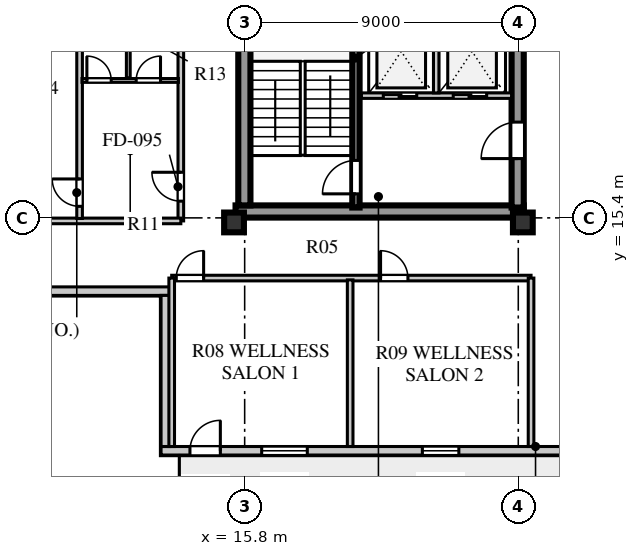
"""IFC4 building model, lengths in metres.
Left out: names, types, materials, properties, quantities, classifications, styles, units other than length and angle.
Written with IfcOpenShell. Run it as: python <this file> out.ifc"""

import sys

from ifc_helpers import new_model, si_unit, direction, frame, frame_2d, origin, origin_2d, place, context, subcontext, project, spatial, rectangle, extrude, element, fill, save


model = new_model("IFC4")
c1 = context("Model", 3, precision=1e-05, world=origin(), true_north=direction((0.0, 1.0)))
c2 = subcontext(c1, "Body", "Model", "MODEL_VIEW")
j1 = project(units=[si_unit("LENGTHUNIT", "METRE"), si_unit("PLANEANGLEUNIT", "RADIAN")], contexts=[c1])
p1 = place(None, origin())
s1 = spatial("IfcSite", under=j1, at=p1, CompositionType="ELEMENT")
p2 = place(p1, origin())
s2 = spatial("IfcBuilding", under=s1, at=p2, CompositionType="ELEMENT")
p3 = place(p2, frame((0.0, 0.0, 260.9)))
s3 = spatial("IfcBuildingStorey", under=s2, at=p3, CompositionType="ELEMENT", Elevation=260.9)
p4 = place(p3, frame((15.5, 15.61, 0.0), z_axis=(0.0, 0.0, 1.0), x_axis=(1.0, 0.0, 0.0)))
e1 = element("IfcWall", 1, at=p4, inside=s3, PredefinedType="SHEAR", context=c2, shape_type="SweptSolid", body=[
    extrude(rectangle(XDim=9.48, YDim=0.4, at=frame_2d((4.74, 0.0))), origin(), (0.0, 0.0, 1.0), 3.66),
])
p5 = place(p3, frame((15.79, 15.81, 0.0), z_axis=(0.0, 0.0, 1.0), x_axis=(0.0, 1.0, 0.0)))
e2 = element("IfcWall", 2, at=p5, inside=s3, PredefinedType="SHEAR", context=c2, shape_type="SweptSolid", body=[
    extrude(rectangle(XDim=25.63, YDim=0.4, at=frame_2d((12.815, 0.0))), origin(), (0.0, 0.0, 1.0), 3.66),
])
p6 = place(p3, frame((24.78, 15.74, 0.0), z_axis=(0.0, 0.0, 1.0), x_axis=(0.0, 1.0, 0.0)))
e3 = element("IfcWall", 3, at=p6, inside=s3, PredefinedType="SHEAR", context=c2, shape_type="SweptSolid", body=[
    extrude(rectangle(XDim=25.76, YDim=0.4, at=frame_2d((12.88, 0.0))), origin(), (0.0, 0.0, 1.0), 3.66),
])
p7 = place(p6, frame((1.61, 0.0, 0.0)))
e4 = element("IfcOpeningElement", 4, at=p7, cuts=e3, PredefinedType="OPENING", context=c2, shape_type="SweptSolid", body=[
    extrude(rectangle(XDim=1.2, YDim=2.1, at=frame_2d((0.6, 1.05))), frame((0.0, 0.21, 0.0), z_axis=(0.0, -1.0, 0.0), x_axis=(1.0, 0.0, 0.0)), (0.0, 0.0, 1.0), 0.42),
])
p8 = place(p6, frame((6.78, 0.0, 0.0)))
e5 = element("IfcOpeningElement", 5, at=p8, cuts=e3, PredefinedType="OPENING", context=c2, shape_type="SweptSolid", body=[
    extrude(rectangle(XDim=0.85, YDim=2.06, at=frame_2d((0.425, 1.03))), frame((0.0, 0.21, 0.0), z_axis=(0.0, -1.0, 0.0), x_axis=(1.0, 0.0, 0.0)), (0.0, 0.0, 1.0), 0.42),
])
p9 = place(p6, frame((12.11, 0.0, 0.0)))
e6 = element("IfcOpeningElement", 6, at=p9, cuts=e3, PredefinedType="OPENING", context=c2, shape_type="SweptSolid", body=[
    extrude(rectangle(XDim=1.5, YDim=2.12, at=frame_2d((0.75, 1.06))), frame((0.0, 0.21, 0.0), z_axis=(0.0, -1.0, 0.0), x_axis=(1.0, 0.0, 0.0)), (0.0, 0.0, 1.0), 0.42),
])
p10 = place(p6, frame((20.11, 0.0, 0.0)))
e7 = element("IfcOpeningElement", 7, at=p10, cuts=e3, PredefinedType="OPENING", context=c2, shape_type="SweptSolid", body=[
    extrude(rectangle(XDim=1.2, YDim=2.12, at=frame_2d((0.6, 1.06))), frame((0.0, 0.21, 0.0), z_axis=(0.0, -1.0, 0.0), x_axis=(1.0, 0.0, 0.0)), (0.0, 0.0, 1.0), 0.42),
])
p11 = place(p6, frame((24.01, 0.0, 0.0)))
e8 = element("IfcOpeningElement", 8, at=p11, cuts=e3, PredefinedType="OPENING", context=c2, shape_type="SweptSolid", body=[
    extrude(rectangle(XDim=0.95, YDim=2.1, at=frame_2d((0.475, 1.05))), frame((0.0, 0.21, 0.0), z_axis=(0.0, -1.0, 0.0), x_axis=(1.0, 0.0, 0.0)), (0.0, 0.0, 1.0), 0.42),
])
for number, where, z_axis, x_axis in (
    (9, (15.45, 15.25, 0.0), (0.0, 0.0, 1.0), (1.0, 0.0, 0.0)),
    (10, (24.95, 15.25, 0.0), (0.0, 0.0, 1.0), (1.0, 0.0, 0.0)),
):
    element("IfcColumn", number, at=place(p3, frame(where, z_axis=z_axis, x_axis=x_axis)), inside=s3, PredefinedType="COLUMN", context=c2, shape_type="SweptSolid", body=[
        extrude(rectangle(XDim=0.65, YDim=0.65, at=origin_2d()), origin(), (0.0, 0.0, 1.0), 3.66),
    ])
p12 = place(p3, frame((13.05, 7.74, 0.0), z_axis=(0.0, 0.0, 1.0), x_axis=(1.0, 0.0, 0.0)))
e11 = element("IfcWall", 11, at=p12, inside=s3, PredefinedType="STANDARD", context=c2, shape_type="SweptSolid", body=[
    extrude(rectangle(XDim=32.5, YDim=0.28, at=frame_2d((16.25, 0.0))), origin(), (0.0, 0.0, 1.0), 3.66),
])
p13 = place(p12, frame((0.95, 0.0, 0.0)))
e12 = element("IfcOpeningElement", 12, at=p13, cuts=e11, PredefinedType="OPENING", context=c2, shape_type="SweptSolid", body=[
    extrude(rectangle(XDim=1.0, YDim=2.05, at=frame_2d((0.5, 1.025))), frame((0.0, 0.15, 0.0), z_axis=(0.0, -1.0, 0.0), x_axis=(1.0, 0.0, 0.0)), (0.0, 0.0, 1.0), 0.3),
])
p14 = place(p12, frame((3.31, 0.0, 0.8)))
e13 = element("IfcOpeningElement", 13, at=p14, cuts=e11, PredefinedType="OPENING", context=c2, shape_type="SweptSolid", body=[
    extrude(rectangle(XDim=1.5, YDim=2.0, at=frame_2d((0.75, 1.0))), frame((0.0, 0.15, 0.0), z_axis=(0.0, -1.0, 0.0), x_axis=(1.0, 0.0, 0.0)), (0.0, 0.0, 1.0), 0.3),
])
p15 = place(p12, frame((8.595, 0.0, 0.8)))
e14 = element("IfcOpeningElement", 14, at=p15, cuts=e11, PredefinedType="OPENING", context=c2, shape_type="SweptSolid", body=[
    extrude(rectangle(XDim=1.2, YDim=1.75, at=frame_2d((0.6, 0.875))), frame((0.0, 0.15, 0.0), z_axis=(0.0, -1.0, 0.0), x_axis=(1.0, 0.0, 0.0)), (0.0, 0.0, 1.0), 0.3),
])
p16 = place(p12, frame((14.84, 0.0, 0.8)))
e15 = element("IfcOpeningElement", 15, at=p16, cuts=e11, PredefinedType="OPENING", context=c2, shape_type="SweptSolid", body=[
    extrude(rectangle(XDim=2.4, YDim=2.05, at=frame_2d((1.2, 1.025))), frame((0.0, 0.15, 0.0), z_axis=(0.0, -1.0, 0.0), x_axis=(1.0, 0.0, 0.0)), (0.0, 0.0, 1.0), 0.3),
])
p17 = place(p12, frame((19.0, 0.0, 0.8)))
e16 = element("IfcOpeningElement", 16, at=p17, cuts=e11, PredefinedType="OPENING", context=c2, shape_type="SweptSolid", body=[
    extrude(rectangle(XDim=2.1, YDim=1.95, at=frame_2d((1.05, 0.975))), frame((0.0, 0.15, 0.0), z_axis=(0.0, -1.0, 0.0), x_axis=(1.0, 0.0, 0.0)), (0.0, 0.0, 1.0), 0.3),
])
p18 = place(p12, frame((23.4, 0.0, 0.8)))
e17 = element("IfcOpeningElement", 17, at=p18, cuts=e11, PredefinedType="OPENING", context=c2, shape_type="SweptSolid", body=[
    extrude(rectangle(XDim=1.35, YDim=1.9, at=frame_2d((0.675, 0.95))), frame((0.0, 0.15, 0.0), z_axis=(0.0, -1.0, 0.0), x_axis=(1.0, 0.0, 0.0)), (0.0, 0.0, 1.0), 0.3),
])
p19 = place(p12, frame((28.42, 0.0, 0.8)))
e18 = element("IfcOpeningElement", 18, at=p19, cuts=e11, PredefinedType="OPENING", context=c2, shape_type="SweptSolid", body=[
    extrude(rectangle(XDim=1.65, YDim=1.95, at=frame_2d((0.825, 0.975))), frame((0.0, 0.15, 0.0), z_axis=(0.0, -1.0, 0.0), x_axis=(1.0, 0.0, 0.0)), (0.0, 0.0, 1.0), 0.3),
])
p20 = place(p3, frame((7.8, 12.99, 0.0), z_axis=(0.0, 0.0, 1.0), x_axis=(1.0, 0.0, 0.0)))
e19 = element("IfcWall", 19, at=p20, inside=s3, PredefinedType="STANDARD", context=c2, shape_type="SweptSolid", body=[
    extrude(rectangle(XDim=5.53, YDim=0.28, at=frame_2d((2.765, 0.0))), origin(), (0.0, 0.0, 1.0), 3.66),
])
p21 = place(p3, frame((13.19, 12.85, 0.0), z_axis=(0.0, 0.0, 1.0), x_axis=(0.0, -1.0, 0.0)))
e20 = element("IfcWall", 20, at=p21, inside=s3, PredefinedType="STANDARD", context=c2, shape_type="SweptSolid", body=[
    extrude(rectangle(XDim=4.97, YDim=0.28, at=frame_2d((2.485, 0.0))), origin(), (0.0, 0.0, 1.0), 3.66),
])
p22 = place(p3, frame((19.46, 15.74, 0.0), z_axis=(0.0, 0.0, 1.0), x_axis=(0.0, 1.0, 0.0)))
e21 = element("IfcWall", 21, at=p22, inside=s3, PredefinedType="SHEAR", context=c2, shape_type="SweptSolid", body=[
    extrude(rectangle(XDim=8.2, YDim=0.24, at=frame_2d((4.1, 0.0))), origin(), (0.0, 0.0, 1.0), 3.9),
])
p23 = place(p22, frame((0.45, 0.0, 0.0)))
e22 = element("IfcOpeningElement", 22, at=p23, cuts=e21, PredefinedType="OPENING", context=c2, shape_type="SweptSolid", body=[
    extrude(rectangle(XDim=1.1, YDim=2.1, at=frame_2d((0.55, 1.05))), frame((0.0, 0.13, 0.0), z_axis=(0.0, -1.0, 0.0), x_axis=(1.0, 0.0, 0.0)), (0.0, 0.0, 1.0), 0.26),
])
p24 = place(p3, frame((19.64, 19.42, 0.0), z_axis=(0.0, 0.0, 1.0), x_axis=(1.0, 0.0, 0.0)))
e23 = element("IfcWall", 23, at=p24, inside=s3, PredefinedType="SOLIDWALL", context=c2, shape_type="SweptSolid", body=[
    extrude(rectangle(XDim=4.94, YDim=0.18, at=frame_2d((2.47, 0.0))), origin(), (0.0, 0.0, 1.0), 3.66),
])
p25 = place(p24, frame((0.72, 0.0, 0.0)))
e24 = element("IfcOpeningElement", 24, at=p25, cuts=e23, PredefinedType="OPENING", context=c2, shape_type="SweptSolid", body=[
    extrude(rectangle(XDim=1.1, YDim=2.1, at=frame_2d((0.55, 1.05))), frame((0.0, 0.1, 0.0), z_axis=(0.0, -1.0, 0.0), x_axis=(1.0, 0.0, 0.0)), (0.0, 0.0, 1.0), 0.2),
])
p26 = place(p24, frame((3.02, 0.0, 0.0)))
e25 = element("IfcOpeningElement", 25, at=p26, cuts=e23, PredefinedType="OPENING", context=c2, shape_type="SweptSolid", body=[
    extrude(rectangle(XDim=1.1, YDim=2.1, at=frame_2d((0.55, 1.05))), frame((0.0, 0.1, 0.0), z_axis=(0.0, -1.0, 0.0), x_axis=(1.0, 0.0, 0.0)), (0.0, 0.0, 1.0), 0.2),
])
p27 = place(p3, frame((22.1, 19.51, 0.0), z_axis=(0.0, 0.0, 1.0), x_axis=(0.0, 1.0, 0.0)))
e26 = element("IfcWall", 26, at=p27, inside=s3, PredefinedType="SOLIDWALL", context=c2, shape_type="SweptSolid", body=[
    extrude(rectangle(XDim=2.74, YDim=0.18, at=frame_2d((1.37, 0.0))), origin(), (0.0, 0.0, 1.0), 3.66),
])
p28 = place(p3, frame((13.4, 13.42, 0.0), z_axis=(0.0, 0.0, 1.0), x_axis=(1.0, 0.0, 0.0)))
e27 = element("IfcWall", 27, at=p28, inside=s3, PredefinedType="SOLIDWALL", context=c2, shape_type="SweptSolid", body=[
    extrude(rectangle(XDim=11.82, YDim=0.185, at=frame_2d((5.91, 0.0))), origin(), (0.0, 0.0, 1.0), 3.66),
])
p29 = place(p28, frame((0.15, 0.0, 0.0)))
e28 = element("IfcOpeningElement", 28, at=p29, cuts=e27, PredefinedType="OPENING", context=c2, shape_type="SweptSolid", body=[
    extrude(rectangle(XDim=0.9, YDim=2.08, at=frame_2d((0.45, 1.04))), frame((0.0, 0.103, 0.0), z_axis=(0.0, -1.0, 0.0), x_axis=(1.0, 0.0, 0.0)), (0.0, 0.0, 1.0), 0.205),
])
p30 = place(p28, frame((6.87, 0.0, 0.0)))
e29 = element("IfcOpeningElement", 29, at=p30, cuts=e27, PredefinedType="OPENING", context=c2, shape_type="SweptSolid", body=[
    extrude(rectangle(XDim=0.9, YDim=2.08, at=frame_2d((0.45, 1.04))), frame((0.0, 0.103, 0.0), z_axis=(0.0, -1.0, 0.0), x_axis=(1.0, 0.0, 0.0)), (0.0, 0.0, 1.0), 0.205),
])
p31 = place(p3, frame((13.4, 7.88, 0.0), z_axis=(0.0, 0.0, 1.0), x_axis=(0.0, 1.0, 0.0)))
e30 = element("IfcWall", 30, at=p31, inside=s3, PredefinedType="SOLIDWALL", context=c2, shape_type="SweptSolid", body=[
    extrude(rectangle(XDim=5.54, YDim=0.185, at=frame_2d((2.77, 0.0))), origin(), (0.0, 0.0, 1.0), 3.66),
])
p32 = place(p3, frame((25.22, 7.88, 0.0), z_axis=(0.0, 0.0, 1.0), x_axis=(0.0, 1.0, 0.0)))
e31 = element("IfcWall", 31, at=p32, inside=s3, PredefinedType="SOLIDWALL", context=c2, shape_type="SweptSolid", body=[
    extrude(rectangle(XDim=5.54, YDim=0.185, at=frame_2d((2.77, 0.0))), origin(), (0.0, 0.0, 1.0), 3.21),
])
p33 = place(p3, frame((19.27, 7.88, 0.0), z_axis=(0.0, 0.0, 1.0), x_axis=(0.0, 1.0, 0.0)))
e32 = element("IfcWall", 32, at=p33, inside=s3, PredefinedType="SOLIDWALL", context=c2, shape_type="SweptSolid", body=[
    extrude(rectangle(XDim=5.48, YDim=0.185, at=frame_2d((2.74, 0.0))), origin(), (0.0, 0.0, 1.0), 3.66),
])
p34 = place(p3, frame((13.7, 15.3, 0.0), z_axis=(0.0, 0.0, 1.0), x_axis=(0.0, 1.0, 0.0)))
e33 = element("IfcWall", 33, at=p34, inside=s3, PredefinedType="SOLIDWALL", context=c2, shape_type="SweptSolid", body=[
    extrude(rectangle(XDim=26.6, YDim=0.185, at=frame_2d((13.3, 0.0))), origin(), (0.0, 0.0, 1.0), 3.66),
])
p35 = place(p34, frame((0.65, 0.0, 0.0)))
e34 = element("IfcOpeningElement", 34, at=p35, cuts=e33, PredefinedType="OPENING", context=c2, shape_type="SweptSolid", body=[
    extrude(rectangle(XDim=0.95, YDim=2.1, at=frame_2d((0.475, 1.05))), frame((0.0, 0.103, 0.0), z_axis=(0.0, -1.0, 0.0), x_axis=(1.0, 0.0, 0.0)), (0.0, 0.0, 1.0), 0.205),
])
p36 = place(p34, frame((7.1, 0.0, 0.0)))
e35 = element("IfcOpeningElement", 35, at=p36, cuts=e33, PredefinedType="OPENING", context=c2, shape_type="SweptSolid", body=[
    extrude(rectangle(XDim=0.95, YDim=2.1, at=frame_2d((0.475, 1.05))), frame((0.0, 0.103, 0.0), z_axis=(0.0, -1.0, 0.0), x_axis=(1.0, 0.0, 0.0)), (0.0, 0.0, 1.0), 0.205),
])
p37 = place(p34, frame((14.35, 0.0, 0.0)))
e36 = element("IfcOpeningElement", 36, at=p37, cuts=e33, PredefinedType="OPENING", context=c2, shape_type="SweptSolid", body=[
    extrude(rectangle(XDim=0.95, YDim=2.1, at=frame_2d((0.475, 1.05))), frame((0.0, 0.103, 0.0), z_axis=(0.0, -1.0, 0.0), x_axis=(1.0, 0.0, 0.0)), (0.0, 0.0, 1.0), 0.205),
])
p38 = place(p3, frame((8.08, 15.3, 0.0), z_axis=(0.0, 0.0, 1.0), x_axis=(1.0, 0.0, 0.0)))
e37 = element("IfcWall", 37, at=p38, inside=s3, PredefinedType="SOLIDWALL", context=c2, shape_type="SweptSolid", body=[
    extrude(rectangle(XDim=5.62, YDim=0.185, at=frame_2d((2.81, 0.0))), origin(), (0.0, 0.0, 1.0), 3.21),
])
p39 = place(p3, frame((10.37, 15.38, 0.0), z_axis=(0.0, 0.0, 1.0), x_axis=(0.0, 1.0, 0.0)))
e38 = element("IfcWall", 38, at=p39, inside=s3, PredefinedType="SOLIDWALL", context=c2, shape_type="SweptSolid", body=[
    extrude(rectangle(XDim=6.94, YDim=0.185, at=frame_2d((3.47, 0.0))), origin(), (0.0, 0.0, 1.0), 3.66),
])
p40 = place(p39, frame((0.4, 0.0, 0.0)))
e39 = element("IfcOpeningElement", 39, at=p40, cuts=e38, PredefinedType="OPENING", context=c2, shape_type="SweptSolid", body=[
    extrude(rectangle(XDim=0.9, YDim=2.08, at=frame_2d((0.45, 1.04))), frame((0.0, 0.103, 0.0), z_axis=(0.0, -1.0, 0.0), x_axis=(1.0, 0.0, 0.0)), (0.0, 0.0, 1.0), 0.205),
])
p41 = place(p3, frame((10.45, 19.92, 0.0), z_axis=(0.0, 0.0, 1.0), x_axis=(1.0, 0.0, 0.0)))
e40 = element("IfcWall", 40, at=p41, inside=s3, PredefinedType="PLUMBINGWALL", context=c2, shape_type="SweptSolid", body=[
    extrude(rectangle(XDim=3.17, YDim=0.125, at=frame_2d((1.585, 0.0))), origin(), (0.0, 0.0, 1.0), 3.66),
])
p42 = place(p41, frame((0.16, 0.0, 0.0)))
e41 = element("IfcOpeningElement", 41, at=p42, cuts=e40, PredefinedType="OPENING", context=c2, shape_type="SweptSolid", body=[
    extrude(rectangle(XDim=0.8, YDim=2.05, at=frame_2d((0.4, 1.025))), frame((0.0, 0.073, 0.0), z_axis=(0.0, -1.0, 0.0), x_axis=(1.0, 0.0, 0.0)), (0.0, 0.0, 1.0), 0.145),
])
p43 = place(p41, frame((1.782, 0.0, 0.0)))
e42 = element("IfcOpeningElement", 42, at=p43, cuts=e40, PredefinedType="OPENING", context=c2, shape_type="SweptSolid", body=[
    extrude(rectangle(XDim=0.8, YDim=2.05, at=frame_2d((0.4, 1.025))), frame((0.0, 0.073, 0.0), z_axis=(0.0, -1.0, 0.0), x_axis=(1.0, 0.0, 0.0)), (0.0, 0.0, 1.0), 0.145),
])
p44 = place(p3, frame((11.972, 20.0, 0.0), z_axis=(0.0, 0.0, 1.0), x_axis=(0.0, 1.0, 0.0)))
e43 = element("IfcWall", 43, at=p44, inside=s3, PredefinedType="PLUMBINGWALL", context=c2, shape_type="SweptSolid", body=[
    extrude(rectangle(XDim=2.32, YDim=0.125, at=frame_2d((1.16, 0.0))), origin(), (0.0, 0.0, 1.0), 3.66),
])
p45 = place(p13, frame((1.0, 0.0, 0.0), z_axis=(0.0, 0.0, 1.0), x_axis=(-1.0, 0.0, 0.0)))
e44 = element("IfcDoor", 44, at=p45, inside=s3, OperationType="SINGLE_SWING_LEFT", PredefinedType="DOOR", context=c2, shape_type="SweptSolid", body=[
    extrude(rectangle(XDim=1.0, YDim=2.05, at=frame_2d((0.5, 1.025))), frame((0.0, 0.025, 0.0), z_axis=(0.0, -1.0, 0.0), x_axis=(1.0, 0.0, 0.0)), (0.0, 0.0, 1.0), 0.05),
])
fill(e12, e44)
p46 = place(p14, origin())
e45 = element("IfcWindow", 45, at=p46, inside=s3, PartitioningType="SINGLE_PANEL", PredefinedType="WINDOW", context=c2, shape_type="SweptSolid", body=[
    extrude(rectangle(XDim=1.5, YDim=2.0, at=frame_2d((0.75, 1.0))), frame((0.0, 0.03, 0.0), z_axis=(0.0, -1.0, 0.0), x_axis=(1.0, 0.0, 0.0)), (0.0, 0.0, 1.0), 0.06),
])
fill(e13, e45)
p47 = place(p15, origin())
e46 = element("IfcWindow", 46, at=p47, inside=s3, PartitioningType="SINGLE_PANEL", PredefinedType="WINDOW", context=c2, shape_type="SweptSolid", body=[
    extrude(rectangle(XDim=1.2, YDim=1.75, at=frame_2d((0.6, 0.875))), frame((0.0, 0.03, 0.0), z_axis=(0.0, -1.0, 0.0), x_axis=(1.0, 0.0, 0.0)), (0.0, 0.0, 1.0), 0.06),
])
fill(e14, e46)
p48 = place(p23, origin())
e47 = element("IfcDoor", 47, at=p48, inside=s3, OperationType="SINGLE_SWING_LEFT", PredefinedType="DOOR", context=c2, shape_type="SweptSolid", body=[
    extrude(rectangle(XDim=1.1, YDim=2.1, at=frame_2d((0.55, 1.05))), frame((0.0, 0.025, 0.0), z_axis=(0.0, -1.0, 0.0), x_axis=(1.0, 0.0, 0.0)), (0.0, 0.0, 1.0), 0.05),
])
fill(e22, e47)
p49 = place(p25, origin())
e48 = element("IfcDoor", 48, at=p49, inside=s3, OperationType="DOUBLE_DOOR_SLIDING", PredefinedType="DOOR", context=c2, shape_type="SweptSolid", body=[
    extrude(rectangle(XDim=1.1, YDim=2.1, at=frame_2d((0.55, 1.05))), frame((0.0, 0.025, 0.0), z_axis=(0.0, -1.0, 0.0), x_axis=(1.0, 0.0, 0.0)), (0.0, 0.0, 1.0), 0.05),
])
fill(e24, e48)
p50 = place(p26, origin())
e49 = element("IfcDoor", 49, at=p50, inside=s3, OperationType="DOUBLE_DOOR_SLIDING", PredefinedType="DOOR", context=c2, shape_type="SweptSolid", body=[
    extrude(rectangle(XDim=1.1, YDim=2.1, at=frame_2d((0.55, 1.05))), frame((0.0, 0.025, 0.0), z_axis=(0.0, -1.0, 0.0), x_axis=(1.0, 0.0, 0.0)), (0.0, 0.0, 1.0), 0.05),
])
fill(e25, e49)
p51 = place(p7, frame((1.2, 0.0, 0.0), z_axis=(0.0, 0.0, 1.0), x_axis=(-1.0, 0.0, 0.0)))
e50 = element("IfcDoor", 50, at=p51, inside=s3, OperationType="SINGLE_SWING_RIGHT", PredefinedType="DOOR", context=c2, shape_type="SweptSolid", body=[
    extrude(rectangle(XDim=1.2, YDim=2.1, at=frame_2d((0.6, 1.05))), frame((0.0, 0.025, 0.0), z_axis=(0.0, -1.0, 0.0), x_axis=(1.0, 0.0, 0.0)), (0.0, 0.0, 1.0), 0.05),
])
fill(e4, e50)
p52 = place(p29, frame((0.9, 0.0, 0.0), z_axis=(0.0, 0.0, 1.0), x_axis=(-1.0, 0.0, 0.0)))
e51 = element("IfcDoor", 51, at=p52, inside=s3, OperationType="SINGLE_SWING_LEFT", PredefinedType="DOOR", context=c2, shape_type="SweptSolid", body=[
    extrude(rectangle(XDim=0.9, YDim=2.08, at=frame_2d((0.45, 1.04))), frame((0.0, 0.025, 0.0), z_axis=(0.0, -1.0, 0.0), x_axis=(1.0, 0.0, 0.0)), (0.0, 0.0, 1.0), 0.05),
])
fill(e28, e51)
p53 = place(p30, frame((0.9, 0.0, 0.0), z_axis=(0.0, 0.0, 1.0), x_axis=(-1.0, 0.0, 0.0)))
e52 = element("IfcDoor", 52, at=p53, inside=s3, OperationType="SINGLE_SWING_RIGHT", PredefinedType="DOOR", context=c2, shape_type="SweptSolid", body=[
    extrude(rectangle(XDim=0.9, YDim=2.08, at=frame_2d((0.45, 1.04))), frame((0.0, 0.025, 0.0), z_axis=(0.0, -1.0, 0.0), x_axis=(1.0, 0.0, 0.0)), (0.0, 0.0, 1.0), 0.05),
])
fill(e29, e52)
p54 = place(p42, origin())
e53 = element("IfcDoor", 53, at=p54, inside=s3, OperationType="SINGLE_SWING_LEFT", PredefinedType="DOOR", context=c2, shape_type="SweptSolid", body=[
    extrude(rectangle(XDim=0.8, YDim=2.05, at=frame_2d((0.4, 1.025))), frame((0.0, 0.025, 0.0), z_axis=(0.0, -1.0, 0.0), x_axis=(1.0, 0.0, 0.0)), (0.0, 0.0, 1.0), 0.05),
])
fill(e41, e53)
p55 = place(p43, origin())
e54 = element("IfcDoor", 54, at=p55, inside=s3, OperationType="SINGLE_SWING_RIGHT", PredefinedType="DOOR", context=c2, shape_type="SweptSolid", body=[
    extrude(rectangle(XDim=0.8, YDim=2.05, at=frame_2d((0.4, 1.025))), frame((0.0, 0.025, 0.0), z_axis=(0.0, -1.0, 0.0), x_axis=(1.0, 0.0, 0.0)), (0.0, 0.0, 1.0), 0.05),
])
fill(e42, e54)
p56 = place(p40, frame((0.9, 0.0, 0.0), z_axis=(0.0, 0.0, 1.0), x_axis=(-1.0, 0.0, 0.0)))
e55 = element("IfcDoor", 55, at=p56, inside=s3, OperationType="SINGLE_SWING_LEFT", PredefinedType="DOOR", context=c2, shape_type="SweptSolid", body=[
    extrude(rectangle(XDim=0.9, YDim=2.08, at=frame_2d((0.45, 1.04))), frame((0.0, 0.025, 0.0), z_axis=(0.0, -1.0, 0.0), x_axis=(1.0, 0.0, 0.0)), (0.0, 0.0, 1.0), 0.05),
])
fill(e39, e55)
p57 = place(p35, frame((0.95, 0.0, 0.0), z_axis=(0.0, 0.0, 1.0), x_axis=(-1.0, 0.0, 0.0)))
e56 = element("IfcDoor", 56, at=p57, inside=s3, OperationType="SINGLE_SWING_LEFT", PredefinedType="DOOR", context=c2, shape_type="SweptSolid", body=[
    extrude(rectangle(XDim=0.95, YDim=2.1, at=frame_2d((0.475, 1.05))), frame((0.0, 0.025, 0.0), z_axis=(0.0, -1.0, 0.0), x_axis=(1.0, 0.0, 0.0)), (0.0, 0.0, 1.0), 0.05),
])
fill(e34, e56)
save(model, sys.argv[1])
